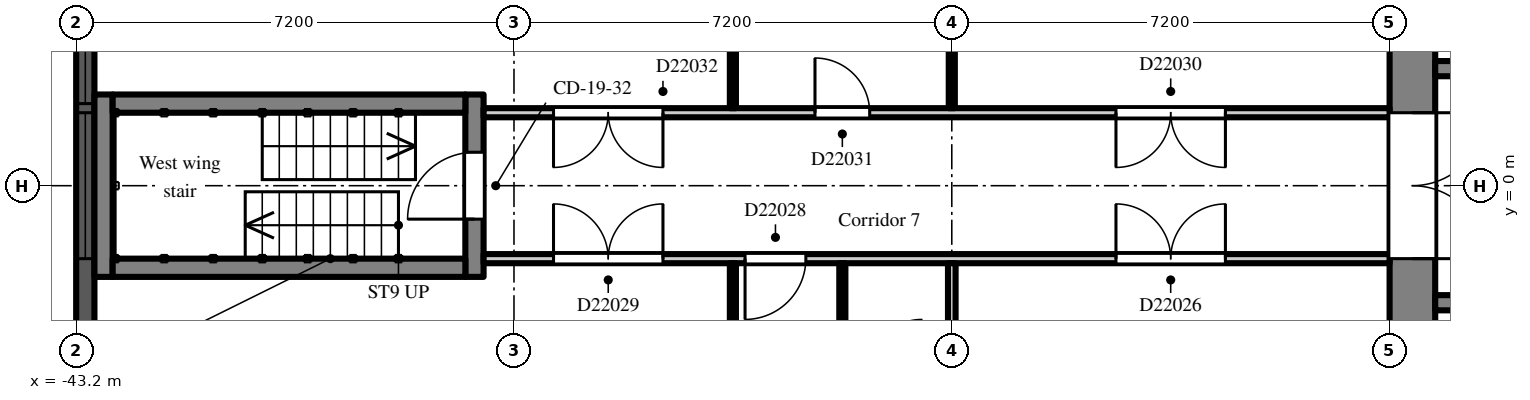
"""IFC4 building model, lengths in metres.
Left out: names, types, materials, properties, quantities, classifications, styles, units other than length and angle.
Written with IfcOpenShell. Run it as: python <this file> out.ifc"""

import sys

from ifc_helpers import new_model, si_unit, direction, frame, frame_2d, origin, place, context, subcontext, project, spatial, rectangle, extrude, element, fill, save


model = new_model("IFC4")
c1 = context("Model", 3, precision=1e-05, world=origin(), true_north=direction((0.0, 1.0)))
c2 = subcontext(c1, "Body", "Model", "MODEL_VIEW")
j1 = project(units=[si_unit("LENGTHUNIT", "METRE"), si_unit("PLANEANGLEUNIT", "RADIAN")], contexts=[c1])
p1 = place(None, origin())
s1 = spatial("IfcSite", under=j1, at=p1, CompositionType="ELEMENT")
p2 = place(p1, origin())
s2 = spatial("IfcBuilding", under=s1, at=p2, CompositionType="ELEMENT")
p3 = place(p2, frame((0.0, 0.0, 159.3)))
s3 = spatial("IfcBuildingStorey", under=s2, at=p3, CompositionType="ELEMENT", Elevation=159.3)
p4 = place(p3, frame((-43.05, 2.7, 0.0), z_axis=(0.0, 0.0, 1.0), x_axis=(0.0, -1.0, 0.0)))
e1 = element("IfcWall", 1, at=p4, inside=s3, PredefinedType="SOLIDWALL", context=c2, shape_type="SweptSolid", body=[
    extrude(rectangle(XDim=5.4, YDim=0.3, at=frame_2d((2.7, 0.0))), origin(), (0.0, 0.0, 1.0), 2.2),
])
p5 = place(p4, frame((1.5, 0.0, 0.2)))
e2 = element("IfcOpeningElement", 2, at=p5, cuts=e1, PredefinedType="OPENING", context=c2, shape_type="SweptSolid", body=[
    extrude(rectangle(XDim=2.4, YDim=1.85, at=frame_2d((1.2, 0.925))), frame((0.0, 0.16, 0.0), z_axis=(0.0, -1.0, 0.0), x_axis=(1.0, 0.0, 0.0)), (0.0, 0.0, 1.0), 0.32),
])
p6 = place(p4, frame((0.15, 0.0, 0.2)))
e3 = element("IfcOpeningElement", 3, at=p6, cuts=e1, PredefinedType="OPENING", context=c2, shape_type="SweptSolid", body=[
    extrude(rectangle(XDim=1.2, YDim=1.85, at=frame_2d((0.6, 0.925))), frame((0.0, 0.16, 0.0), z_axis=(0.0, -1.0, 0.0), x_axis=(1.0, 0.0, 0.0)), (0.0, 0.0, 1.0), 0.32),
])
p7 = place(p3, frame((-21.225, -7.2, 0.0), z_axis=(0.0, 0.0, 1.0), x_axis=(0.0, 1.0, 0.0)))
e4 = element("IfcWall", 4, at=p7, inside=s3, PredefinedType="SHEAR", context=c2, shape_type="SweptSolid", body=[
    extrude(rectangle(XDim=14.4, YDim=0.75, at=frame_2d((7.2, 0.0))), origin(), (0.0, 0.0, 1.0), 2.55),
])
p8 = place(p7, frame((6.0, 0.0, 0.0)))
e5 = element("IfcOpeningElement", 5, at=p8, cuts=e4, PredefinedType="OPENING", context=c2, shape_type="SweptSolid", body=[
    extrude(rectangle(XDim=2.4, YDim=2.2, at=frame_2d((1.2, 1.1))), frame((0.0, 0.385, 0.0), z_axis=(0.0, -1.0, 0.0), x_axis=(1.0, 0.0, 0.0)), (0.0, 0.0, 1.0), 0.77),
])
p9 = place(p3, frame((-7.9, 1.925, 0.0), z_axis=(0.0, 0.0, 1.0), x_axis=(-1.0, 0.0, 0.0)))
e6 = element("IfcWall", 6, at=p9, inside=s3, PredefinedType="SHEAR", context=c2, shape_type="SweptSolid", body=[
    extrude(rectangle(XDim=12.95, YDim=0.25, at=frame_2d((6.475, 0.0))), origin(), (0.0, 0.0, 1.0), 2.55),
])
p10 = place(p9, frame((4.825, 0.0, 0.0)))
e7 = element("IfcOpeningElement", 7, at=p10, cuts=e6, PredefinedType="OPENING", context=c2, shape_type="SweptSolid", body=[
    extrude(rectangle(XDim=1.1, YDim=2.1, at=frame_2d((0.55, 1.05))), frame((0.0, 0.135, 0.0), z_axis=(0.0, -1.0, 0.0), x_axis=(1.0, 0.0, 0.0)), (0.0, 0.0, 1.0), 0.27),
])
p11 = place(p9, frame((7.025, 0.0, 0.0)))
e8 = element("IfcOpeningElement", 8, at=p11, cuts=e6, PredefinedType="OPENING", context=c2, shape_type="SweptSolid", body=[
    extrude(rectangle(XDim=1.1, YDim=2.1, at=frame_2d((0.55, 1.05))), frame((0.0, 0.135, 0.0), z_axis=(0.0, -1.0, 0.0), x_axis=(1.0, 0.0, 0.0)), (0.0, 0.0, 1.0), 0.27),
])
p12 = place(p9, frame((9.225, 0.0, 0.0)))
e9 = element("IfcOpeningElement", 9, at=p12, cuts=e6, PredefinedType="OPENING", context=c2, shape_type="SweptSolid", body=[
    extrude(rectangle(XDim=1.1, YDim=2.1, at=frame_2d((0.55, 1.05))), frame((0.0, 0.135, 0.0), z_axis=(0.0, -1.0, 0.0), x_axis=(1.0, 0.0, 0.0)), (0.0, 0.0, 1.0), 0.27),
])
p13 = place(p9, frame((0.525, 0.0, 0.0)))
e10 = element("IfcOpeningElement", 10, at=p13, cuts=e6, PredefinedType="OPENING", context=c2, shape_type="SweptSolid", body=[
    extrude(rectangle(XDim=0.9, YDim=2.1, at=frame_2d((0.45, 1.05))), frame((0.0, 0.135, 0.0), z_axis=(0.0, -1.0, 0.0), x_axis=(1.0, 0.0, 0.0)), (0.0, 0.0, 1.0), 0.27),
])
p14 = place(p9, frame((2.625, 0.0, 0.0)))
e11 = element("IfcOpeningElement", 11, at=p14, cuts=e6, PredefinedType="OPENING", context=c2, shape_type="SweptSolid", body=[
    extrude(rectangle(XDim=1.1, YDim=2.1, at=frame_2d((0.55, 1.05))), frame((0.0, 0.135, 0.0), z_axis=(0.0, -1.0, 0.0), x_axis=(1.0, 0.0, 0.0)), (0.0, 0.0, 1.0), 0.27),
])
p15 = place(p9, frame((11.525, 0.0, 0.0)))
e12 = element("IfcOpeningElement", 12, at=p15, cuts=e6, PredefinedType="OPENING", context=c2, shape_type="SweptSolid", body=[
    extrude(rectangle(XDim=0.9, YDim=2.1, at=frame_2d((0.45, 1.05))), frame((0.0, 0.135, 0.0), z_axis=(0.0, -1.0, 0.0), x_axis=(1.0, 0.0, 0.0)), (0.0, 0.0, 1.0), 0.27),
])
p16 = place(p3, frame((-7.9, -1.925, 0.0), z_axis=(0.0, 0.0, 1.0), x_axis=(-1.0, 0.0, 0.0)))
e13 = element("IfcWall", 13, at=p16, inside=s3, PredefinedType="SHEAR", context=c2, shape_type="SweptSolid", body=[
    extrude(rectangle(XDim=12.95, YDim=0.25, at=frame_2d((6.475, 0.0))), origin(), (0.0, 0.0, 1.0), 2.55),
])
p17 = place(p16, frame((0.525, 0.0, 0.0)))
e14 = element("IfcOpeningElement", 14, at=p17, cuts=e13, PredefinedType="OPENING", context=c2, shape_type="SweptSolid", body=[
    extrude(rectangle(XDim=0.9, YDim=2.1, at=frame_2d((0.45, 1.05))), frame((0.0, 0.135, 0.0), z_axis=(0.0, -1.0, 0.0), x_axis=(1.0, 0.0, 0.0)), (0.0, 0.0, 1.0), 0.27),
])
p18 = place(p16, frame((2.625, 0.0, 0.0)))
e15 = element("IfcOpeningElement", 15, at=p18, cuts=e13, PredefinedType="OPENING", context=c2, shape_type="SweptSolid", body=[
    extrude(rectangle(XDim=1.1, YDim=2.1, at=frame_2d((0.55, 1.05))), frame((0.0, 0.135, 0.0), z_axis=(0.0, -1.0, 0.0), x_axis=(1.0, 0.0, 0.0)), (0.0, 0.0, 1.0), 0.27),
])
p19 = place(p16, frame((8.225, 0.0, 0.0)))
e16 = element("IfcOpeningElement", 16, at=p19, cuts=e13, PredefinedType="OPENING", context=c2, shape_type="SweptSolid", body=[
    extrude(rectangle(XDim=0.9, YDim=2.1, at=frame_2d((0.45, 1.05))), frame((0.0, 0.135, 0.0), z_axis=(0.0, -1.0, 0.0), x_axis=(1.0, 0.0, 0.0)), (0.0, 0.0, 1.0), 0.27),
])
p20 = place(p3, frame((-36.65, -1.5, 0.0), z_axis=(0.0, 0.0, 1.0), x_axis=(0.0, 1.0, 0.0)))
e17 = element("IfcWall", 17, at=p20, inside=s3, PredefinedType="SHEAR", context=c2, shape_type="SweptSolid", body=[
    extrude(rectangle(XDim=3.0, YDim=0.3, at=frame_2d((1.5, 0.0))), origin(), (0.0, 0.0, 1.0), 2.55),
])
p21 = place(p20, frame((0.95, 0.0, 0.0)))
e18 = element("IfcOpeningElement", 18, at=p21, cuts=e17, PredefinedType="OPENING", context=c2, shape_type="SweptSolid", body=[
    extrude(rectangle(XDim=1.1, YDim=2.1, at=frame_2d((0.55, 1.05))), frame((0.0, 0.16, 0.0), z_axis=(0.0, -1.0, 0.0), x_axis=(1.0, 0.0, 0.0)), (0.0, 0.0, 1.0), 0.32),
])
p22 = place(p3, frame((-42.75, -1.5, 0.0), z_axis=(0.0, 0.0, 1.0), x_axis=(0.0, 1.0, 0.0)))
e19 = element("IfcWall", 19, at=p22, inside=s3, PredefinedType="SHEAR", context=c2, shape_type="SweptSolid", body=[
    extrude(rectangle(XDim=3.0, YDim=0.3, at=frame_2d((1.5, 0.0))), origin(), (0.0, 0.0, 1.0), 2.55),
])
for number, where, z_axis, x_axis in (
    (20, (-36.8, -1.35, 0.0), (0.0, 0.0, 1.0), (-1.0, 0.0, 0.0)),
    (21, (-36.8, 1.35, 0.0), (0.0, 0.0, 1.0), (-1.0, 0.0, 0.0)),
):
    element("IfcWall", number, at=place(p3, frame(where, z_axis=z_axis, x_axis=x_axis)), inside=s3, PredefinedType="SHEAR", context=c2, shape_type="SweptSolid", body=[
        extrude(rectangle(XDim=5.8, YDim=0.3, at=frame_2d((2.9, 0.0))), origin(), (0.0, 0.0, 1.0), 2.55),
    ])
p23 = place(p3, frame((-36.5, -1.2, 0.0), z_axis=(0.0, 0.0, 1.0), x_axis=(1.0, 0.0, 0.0)))
e22 = element("IfcWall", 22, at=p23, inside=s3, PredefinedType="PARTITIONING", context=c2, shape_type="SweptSolid", body=[
    extrude(rectangle(XDim=14.9, YDim=0.15, at=frame_2d((7.45, 0.0))), origin(), (0.0, 0.0, 1.0), 2.55),
])
p24 = place(p23, frame((10.4, 0.0, 0.0)))
e23 = element("IfcOpeningElement", 23, at=p24, cuts=e22, PredefinedType="OPENING", context=c2, shape_type="SweptSolid", body=[
    extrude(rectangle(XDim=1.8, YDim=2.1, at=frame_2d((0.9, 1.05))), frame((0.0, 0.085, 0.0), z_axis=(0.0, -1.0, 0.0), x_axis=(1.0, 0.0, 0.0)), (0.0, 0.0, 1.0), 0.17),
])
p25 = place(p23, frame((4.3, 0.0, 0.0)))
e24 = element("IfcOpeningElement", 24, at=p25, cuts=e22, PredefinedType="OPENING", context=c2, shape_type="SweptSolid", body=[
    extrude(rectangle(XDim=1.0, YDim=2.1, at=frame_2d((0.5, 1.05))), frame((0.0, 0.085, 0.0), z_axis=(0.0, -1.0, 0.0), x_axis=(1.0, 0.0, 0.0)), (0.0, 0.0, 1.0), 0.17),
])
p26 = place(p23, frame((1.15, 0.0, 0.0)))
e25 = element("IfcOpeningElement", 25, at=p26, cuts=e22, PredefinedType="OPENING", context=c2, shape_type="SweptSolid", body=[
    extrude(rectangle(XDim=1.8, YDim=2.1, at=frame_2d((0.9, 1.05))), frame((0.0, 0.085, 0.0), z_axis=(0.0, -1.0, 0.0), x_axis=(1.0, 0.0, 0.0)), (0.0, 0.0, 1.0), 0.17),
])
p27 = place(p3, frame((-36.5, 1.2, 0.0), z_axis=(0.0, 0.0, 1.0), x_axis=(1.0, 0.0, 0.0)))
e26 = element("IfcWall", 26, at=p27, inside=s3, PredefinedType="PARTITIONING", context=c2, shape_type="SweptSolid", body=[
    extrude(rectangle(XDim=14.9, YDim=0.15, at=frame_2d((7.45, 0.0))), origin(), (0.0, 0.0, 1.0), 2.55),
])
p28 = place(p27, frame((10.4, 0.0, 0.0)))
e27 = element("IfcOpeningElement", 27, at=p28, cuts=e26, PredefinedType="OPENING", context=c2, shape_type="SweptSolid", body=[
    extrude(rectangle(XDim=1.8, YDim=2.1, at=frame_2d((0.9, 1.05))), frame((0.0, 0.085, 0.0), z_axis=(0.0, -1.0, 0.0), x_axis=(1.0, 0.0, 0.0)), (0.0, 0.0, 1.0), 0.17),
])
p29 = place(p27, frame((5.45, 0.0, 0.0)))
e28 = element("IfcOpeningElement", 28, at=p29, cuts=e26, PredefinedType="OPENING", context=c2, shape_type="SweptSolid", body=[
    extrude(rectangle(XDim=0.9, YDim=2.1, at=frame_2d((0.45, 1.05))), frame((0.0, 0.085, 0.0), z_axis=(0.0, -1.0, 0.0), x_axis=(1.0, 0.0, 0.0)), (0.0, 0.0, 1.0), 0.17),
])
p30 = place(p27, frame((1.15, 0.0, 0.0)))
e29 = element("IfcOpeningElement", 29, at=p30, cuts=e26, PredefinedType="OPENING", context=c2, shape_type="SweptSolid", body=[
    extrude(rectangle(XDim=1.8, YDim=2.1, at=frame_2d((0.9, 1.05))), frame((0.0, 0.085, 0.0), z_axis=(0.0, -1.0, 0.0), x_axis=(1.0, 0.0, 0.0)), (0.0, 0.0, 1.0), 0.17),
])
for number, where, z_axis, x_axis in (
    (30, (-32.4, -6.9, 0.0), (0.0, 0.0, 1.0), (0.0, 1.0, 0.0)),
    (31, (-32.4, 1.275, 0.0), (0.0, 0.0, 1.0), (0.0, 1.0, 0.0)),
):
    element("IfcWall", number, at=place(p3, frame(where, z_axis=z_axis, x_axis=x_axis)), inside=s3, PredefinedType="PARTITIONING", context=c2, shape_type="SweptSolid", body=[
        extrude(rectangle(XDim=5.625, YDim=0.1, at=frame_2d((2.812, 0.0))), origin(), (0.0, 0.0, 1.0), 2.55),
    ])
p31 = place(p3, frame((-30.6, -3.05, 0.0), z_axis=(0.0, 0.0, 1.0), x_axis=(0.0, 1.0, 0.0)))
e32 = element("IfcWall", 32, at=p31, inside=s3, PredefinedType="PARTITIONING", context=c2, shape_type="SweptSolid", body=[
    extrude(rectangle(XDim=1.775, YDim=0.1, at=frame_2d((0.888, 0.0))), origin(), (0.0, 0.0, 1.0), 2.55),
])
p32 = place(p3, frame((-28.8, -3.0, 0.0), z_axis=(0.0, 0.0, 1.0), x_axis=(0.0, 1.0, 0.0)))
e33 = element("IfcWall", 33, at=p32, inside=s3, PredefinedType="PARTITIONING", context=c2, shape_type="SweptSolid", body=[
    extrude(rectangle(XDim=1.725, YDim=0.125, at=frame_2d((0.863, 0.0))), origin(), (0.0, 0.0, 1.0), 2.55),
])
p33 = place(p3, frame((-28.8, 1.275, 0.0), z_axis=(0.0, 0.0, 1.0), x_axis=(0.0, 1.0, 0.0)))
e34 = element("IfcWall", 34, at=p33, inside=s3, PredefinedType="PARTITIONING", context=c2, shape_type="SweptSolid", body=[
    extrude(rectangle(XDim=5.625, YDim=0.1, at=frame_2d((2.812, 0.0))), origin(), (0.0, 0.0, 1.0), 2.55),
])
p34 = place(p5, origin())
e35 = element("IfcWindow", 35, at=p34, inside=s3, PartitioningType="SINGLE_PANEL", PredefinedType="WINDOW", context=c2, shape_type="SweptSolid", body=[
    extrude(rectangle(XDim=2.4, YDim=1.85, at=frame_2d((1.2, 0.925))), frame((0.0, 0.03, 0.0), z_axis=(0.0, -1.0, 0.0), x_axis=(1.0, 0.0, 0.0)), (0.0, 0.0, 1.0), 0.06),
])
fill(e2, e35)
p35 = place(p6, origin())
e36 = element("IfcWindow", 36, at=p35, inside=s3, PartitioningType="SINGLE_PANEL", PredefinedType="WINDOW", context=c2, shape_type="SweptSolid", body=[
    extrude(rectangle(XDim=1.2, YDim=1.85, at=frame_2d((0.6, 0.925))), frame((0.0, 0.03, 0.0), z_axis=(0.0, -1.0, 0.0), x_axis=(1.0, 0.0, 0.0)), (0.0, 0.0, 1.0), 0.06),
])
fill(e3, e36)
p36 = place(p8, frame((2.4, 0.0, 0.0), z_axis=(0.0, 0.0, 1.0), x_axis=(-1.0, 0.0, 0.0)))
e37 = element("IfcDoor", 37, at=p36, inside=s3, OperationType="DOUBLE_DOOR_DOUBLE_SWING", PredefinedType="DOOR", context=c2, shape_type="SweptSolid", body=[
    extrude(rectangle(XDim=2.4, YDim=2.2, at=frame_2d((1.2, 1.1))), frame((0.0, 0.025, 0.0), z_axis=(0.0, -1.0, 0.0), x_axis=(1.0, 0.0, 0.0)), (0.0, 0.0, 1.0), 0.05),
])
fill(e5, e37)
p37 = place(p21, origin())
e38 = element("IfcDoor", 38, at=p37, inside=s3, OperationType="SINGLE_SWING_LEFT", PredefinedType="DOOR", context=c2, shape_type="SweptSolid", body=[
    extrude(rectangle(XDim=1.1, YDim=2.1, at=frame_2d((0.55, 1.05))), frame((0.0, 0.025, 0.0), z_axis=(0.0, -1.0, 0.0), x_axis=(1.0, 0.0, 0.0)), (0.0, 0.0, 1.0), 0.05),
])
fill(e18, e38)
p38 = place(p24, origin())
e39 = element("IfcDoor", 39, at=p38, inside=s3, OperationType="DOUBLE_DOOR_DOUBLE_SWING", PredefinedType="DOOR", context=c2, shape_type="SweptSolid", body=[
    extrude(rectangle(XDim=1.8, YDim=2.1, at=frame_2d((0.9, 1.05))), frame((0.0, 0.025, 0.0), z_axis=(0.0, -1.0, 0.0), x_axis=(1.0, 0.0, 0.0)), (0.0, 0.0, 1.0), 0.05),
])
fill(e23, e39)
p39 = place(p25, frame((1.0, 0.0, 0.0), z_axis=(0.0, 0.0, 1.0), x_axis=(-1.0, 0.0, 0.0)))
e40 = element("IfcDoor", 40, at=p39, inside=s3, OperationType="SINGLE_SWING_RIGHT", PredefinedType="DOOR", context=c2, shape_type="SweptSolid", body=[
    extrude(rectangle(XDim=1.0, YDim=2.1, at=frame_2d((0.5, 1.05))), frame((0.0, 0.025, 0.0), z_axis=(0.0, -1.0, 0.0), x_axis=(1.0, 0.0, 0.0)), (0.0, 0.0, 1.0), 0.05),
])
fill(e24, e40)
p40 = place(p26, origin())
e41 = element("IfcDoor", 41, at=p40, inside=s3, OperationType="DOUBLE_DOOR_DOUBLE_SWING", PredefinedType="DOOR", context=c2, shape_type="SweptSolid", body=[
    extrude(rectangle(XDim=1.8, YDim=2.1, at=frame_2d((0.9, 1.05))), frame((0.0, 0.025, 0.0), z_axis=(0.0, -1.0, 0.0), x_axis=(1.0, 0.0, 0.0)), (0.0, 0.0, 1.0), 0.05),
])
fill(e25, e41)
p41 = place(p28, frame((1.8, 0.0, 0.0), z_axis=(0.0, 0.0, 1.0), x_axis=(-1.0, 0.0, 0.0)))
e42 = element("IfcDoor", 42, at=p41, inside=s3, OperationType="DOUBLE_DOOR_DOUBLE_SWING", PredefinedType="DOOR", context=c2, shape_type="SweptSolid", body=[
    extrude(rectangle(XDim=1.8, YDim=2.1, at=frame_2d((0.9, 1.05))), frame((0.0, 0.025, 0.0), z_axis=(0.0, -1.0, 0.0), x_axis=(1.0, 0.0, 0.0)), (0.0, 0.0, 1.0), 0.05),
])
fill(e27, e42)
p42 = place(p29, origin())
e43 = element("IfcDoor", 43, at=p42, inside=s3, OperationType="SINGLE_SWING_LEFT", PredefinedType="DOOR", context=c2, shape_type="SweptSolid", body=[
    extrude(rectangle(XDim=0.9, YDim=2.1, at=frame_2d((0.45, 1.05))), frame((0.0, 0.025, 0.0), z_axis=(0.0, -1.0, 0.0), x_axis=(1.0, 0.0, 0.0)), (0.0, 0.0, 1.0), 0.05),
])
fill(e28, e43)
p43 = place(p30, frame((1.8, 0.0, 0.0), z_axis=(0.0, 0.0, 1.0), x_axis=(-1.0, 0.0, 0.0)))
e44 = element("IfcDoor", 44, at=p43, inside=s3, OperationType="DOUBLE_DOOR_DOUBLE_SWING", PredefinedType="DOOR", context=c2, shape_type="SweptSolid", body=[
    extrude(rectangle(XDim=1.8, YDim=2.1, at=frame_2d((0.9, 1.05))), frame((0.0, 0.025, 0.0), z_axis=(0.0, -1.0, 0.0), x_axis=(1.0, 0.0, 0.0)), (0.0, 0.0, 1.0), 0.05),
])
fill(e29, e44)
save(model, sys.argv[1])
